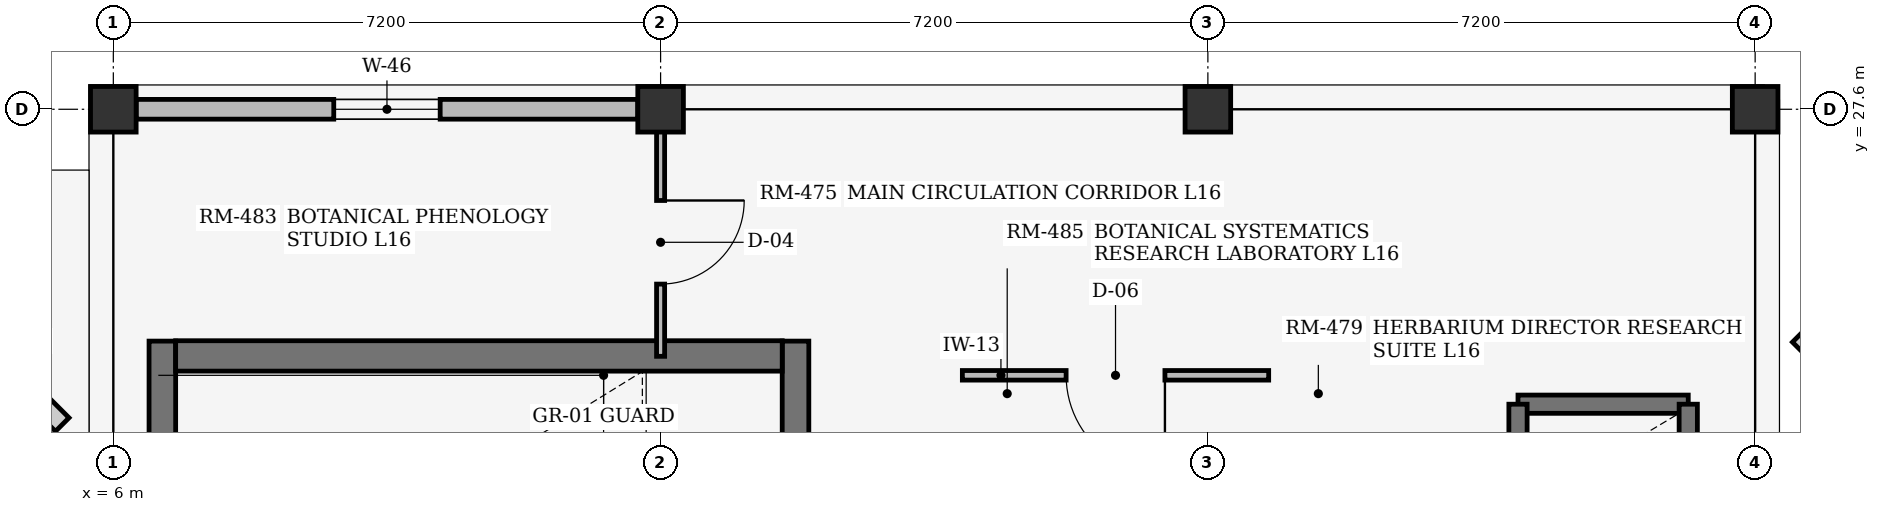
"""IFC4 building model, lengths in metres.
Left out: names, types, materials, properties, quantities, classifications, styles, units other than length and angle.
Written with IfcOpenShell. Run it as: python <this file> out.ifc"""

import sys

from ifc_helpers import new_model, si_unit, direction, frame, frame_2d, origin, origin_2d, place, context, subcontext, project, spatial, rectangle, extrude, element, fill, save


model = new_model("IFC4")
c1 = context("Model", 3, precision=1e-05, world=origin(), true_north=direction((0.0, 1.0)))
c2 = subcontext(c1, "Body", "Model", "MODEL_VIEW")
j1 = project(units=[si_unit("LENGTHUNIT", "METRE"), si_unit("PLANEANGLEUNIT", "RADIAN")], contexts=[c1])
p1 = place(None, origin())
s1 = spatial("IfcSite", under=j1, at=p1, CompositionType="ELEMENT")
p2 = place(p1, origin())
s2 = spatial("IfcBuilding", under=s1, at=p2, CompositionType="ELEMENT")
p3 = place(p2, frame((0.0, 0.0, 63.15)))
s3 = spatial("IfcBuildingStorey", under=s2, at=p3, CompositionType="ELEMENT", Elevation=63.15)
for number, where, z_axis, x_axis in (
    (1, (6.0, 27.6, 0.0), (0.0, 0.0, 1.0), (1.0, 0.0, 0.0)),
    (2, (13.2, 27.6, 0.0), (0.0, 0.0, 1.0), (1.0, 0.0, 0.0)),
    (3, (20.4, 27.6, 0.0), (0.0, 0.0, 1.0), (1.0, 0.0, 0.0)),
    (4, (27.6, 27.6, 0.0), (0.0, 0.0, 1.0), (1.0, 0.0, 0.0)),
):
    element("IfcColumn", number, at=place(p3, frame(where, z_axis=z_axis, x_axis=x_axis)), inside=s3, PredefinedType="COLUMN", context=c2, shape_type="SweptSolid", body=[
        extrude(rectangle(XDim=0.6, YDim=0.6, at=origin_2d()), origin(), (0.0, 0.0, 1.0), 3.49),
    ])
p4 = place(p3, frame((6.3, 27.6, 0.0), z_axis=(0.0, 0.0, 1.0), x_axis=(1.0, 0.0, 0.0)))
e5 = element("IfcWall", 5, at=p4, inside=s3, PredefinedType="STANDARD", context=c2, shape_type="SweptSolid", body=[
    extrude(rectangle(XDim=6.6, YDim=0.26, at=frame_2d((3.3, 0.0))), origin(), (0.0, 0.0, 1.0), 3.07),
])
p5 = place(p4, frame((2.6, 0.0, 0.75)))
e6 = element("IfcOpeningElement", 6, at=p5, cuts=e5, PredefinedType="OPENING", context=c2, shape_type="SweptSolid", body=[
    extrude(rectangle(XDim=1.4, YDim=1.25, at=frame_2d((0.7, 0.625))), frame((0.0, 0.14, 0.0), z_axis=(0.0, -1.0, 0.0), x_axis=(1.0, 0.0, 0.0)), (0.0, 0.0, 1.0), 0.28),
])
p6 = place(p3, frame((14.975, 24.55, 0.0), z_axis=(0.0, 0.0, 1.0), x_axis=(0.0, -1.0, 0.0)))
e7 = element("IfcWall", 7, at=p6, inside=s3, PredefinedType="SHEAR", context=c2, shape_type="SweptSolid", body=[
    extrude(rectangle(XDim=4.59, YDim=0.35, at=frame_2d((2.295, 0.0))), origin(), (0.0, 0.0, 1.0), 3.49),
])
p7 = place(p6, frame((1.72, 0.0, 0.0)))
e8 = element("IfcOpeningElement", 8, at=p7, cuts=e7, PredefinedType="OPENING", context=c2, shape_type="SweptSolid", body=[
    extrude(rectangle(XDim=1.15, YDim=2.2, at=frame_2d((0.575, 1.1))), frame((0.0, 0.185, 0.0), z_axis=(0.0, -1.0, 0.0), x_axis=(1.0, 0.0, 0.0)), (0.0, 0.0, 1.0), 0.37),
])
p8 = place(p3, frame((6.645, 24.55, 0.0), z_axis=(0.0, 0.0, 1.0), x_axis=(0.0, -1.0, 0.0)))
e9 = element("IfcWall", 9, at=p8, inside=s3, PredefinedType="SHEAR", context=c2, shape_type="SweptSolid", body=[
    extrude(rectangle(XDim=4.59, YDim=0.35, at=frame_2d((2.295, 0.0))), origin(), (0.0, 0.0, 1.0), 3.49),
])
p9 = place(p3, frame((14.8, 24.355, 0.0), z_axis=(0.0, 0.0, 1.0), x_axis=(-1.0, 0.0, 0.0)))
e10 = element("IfcWall", 10, at=p9, inside=s3, PredefinedType="SHEAR", context=c2, shape_type="SweptSolid", body=[
    extrude(rectangle(XDim=7.98, YDim=0.4, at=frame_2d((3.99, 0.0))), origin(), (0.0, 0.0, 1.0), 3.49),
])
p10 = place(p3, frame((24.48, 23.72, 0.0), z_axis=(0.0, 0.0, 1.0), x_axis=(1.0, 0.0, 0.0)))
e11 = element("IfcWall", 11, at=p10, inside=s3, PredefinedType="SHEAR", context=c2, shape_type="SweptSolid", body=[
    extrude(rectangle(XDim=2.24, YDim=0.24, at=frame_2d((1.12, 0.0))), origin(), (0.0, 0.0, 1.0), 3.49),
])
for number, where, z_axis, x_axis in (
    (12, (24.48, 20.78, 0.0), (0.0, 0.0, 1.0), (0.0, 1.0, 0.0)),
    (13, (26.72, 20.78, 0.0), (0.0, 0.0, 1.0), (0.0, 1.0, 0.0)),
):
    element("IfcWall", number, at=place(p3, frame(where, z_axis=z_axis, x_axis=x_axis)), inside=s3, PredefinedType="SHEAR", context=c2, shape_type="SweptSolid", body=[
        extrude(rectangle(XDim=2.94, YDim=0.24, at=frame_2d((1.47, 0.0))), origin(), (0.0, 0.0, 1.0), 3.49),
    ])
p11 = place(p3, frame((13.2, 24.35, 0.0), z_axis=(0.0, 0.0, 1.0), x_axis=(0.0, 1.0, 0.0)))
e14 = element("IfcWall", 14, at=p11, inside=s3, PredefinedType="PARTITIONING", context=c2, shape_type="SweptSolid", body=[
    extrude(rectangle(XDim=3.0, YDim=0.106, at=frame_2d((1.5, 0.0))), origin(), (0.0, 0.0, 1.0), 3.08),
])
p12 = place(p11, frame((0.95, 0.0, 0.0)))
e15 = element("IfcOpeningElement", 15, at=p12, cuts=e14, PredefinedType="OPENING", context=c2, shape_type="SweptSolid", body=[
    extrude(rectangle(XDim=1.1, YDim=2.2, at=frame_2d((0.55, 1.1))), frame((0.0, 0.063, 0.0), z_axis=(0.0, -1.0, 0.0), x_axis=(1.0, 0.0, 0.0)), (0.0, 0.0, 1.0), 0.126),
])
p13 = place(p3, frame((17.17, 24.1, 0.0), z_axis=(0.0, 0.0, 1.0), x_axis=(1.0, 0.0, 0.0)))
e16 = element("IfcWall", 16, at=p13, inside=s3, PredefinedType="PARTITIONING", context=c2, shape_type="SweptSolid", body=[
    extrude(rectangle(XDim=4.03, YDim=0.126, at=frame_2d((2.015, 0.0))), origin(), (0.0, 0.0, 1.0), 3.47),
])
p14 = place(p13, frame((1.365, 0.0, 0.0)))
e17 = element("IfcOpeningElement", 17, at=p14, cuts=e16, PredefinedType="OPENING", context=c2, shape_type="SweptSolid", body=[
    extrude(rectangle(XDim=1.3, YDim=2.2, at=frame_2d((0.65, 1.1))), frame((0.0, 0.073, 0.0), z_axis=(0.0, -1.0, 0.0), x_axis=(1.0, 0.0, 0.0)), (0.0, 0.0, 1.0), 0.146),
])
p15 = place(p5, origin())
e18 = element("IfcWindow", 18, at=p15, inside=s3, PartitioningType="SINGLE_PANEL", PredefinedType="WINDOW", context=c2, shape_type="SweptSolid", body=[
    extrude(rectangle(XDim=1.4, YDim=1.25, at=frame_2d((0.7, 0.625))), frame((0.0, 0.03, 0.0), z_axis=(0.0, -1.0, 0.0), x_axis=(1.0, 0.0, 0.0)), (0.0, 0.0, 1.0), 0.06),
])
fill(e6, e18)
p16 = place(p12, origin())
e19 = element("IfcDoor", 19, at=p16, inside=s3, OperationType="SINGLE_SWING_RIGHT", PredefinedType="DOOR", context=c2, shape_type="SweptSolid", body=[
    extrude(rectangle(XDim=1.1, YDim=2.2, at=frame_2d((0.55, 1.1))), frame((0.0, 0.025, 0.0), z_axis=(0.0, -1.0, 0.0), x_axis=(1.0, 0.0, 0.0)), (0.0, 0.0, 1.0), 0.05),
])
fill(e15, e19)
p17 = place(p14, origin())
e20 = element("IfcDoor", 20, at=p17, inside=s3, OperationType="SINGLE_SWING_RIGHT", PredefinedType="DOOR", context=c2, shape_type="SweptSolid", body=[
    extrude(rectangle(XDim=1.3, YDim=2.2, at=frame_2d((0.65, 1.1))), frame((0.0, 0.025, 0.0), z_axis=(0.0, -1.0, 0.0), x_axis=(1.0, 0.0, 0.0)), (0.0, 0.0, 1.0), 0.05),
])
fill(e17, e20)
save(model, sys.argv[1])
